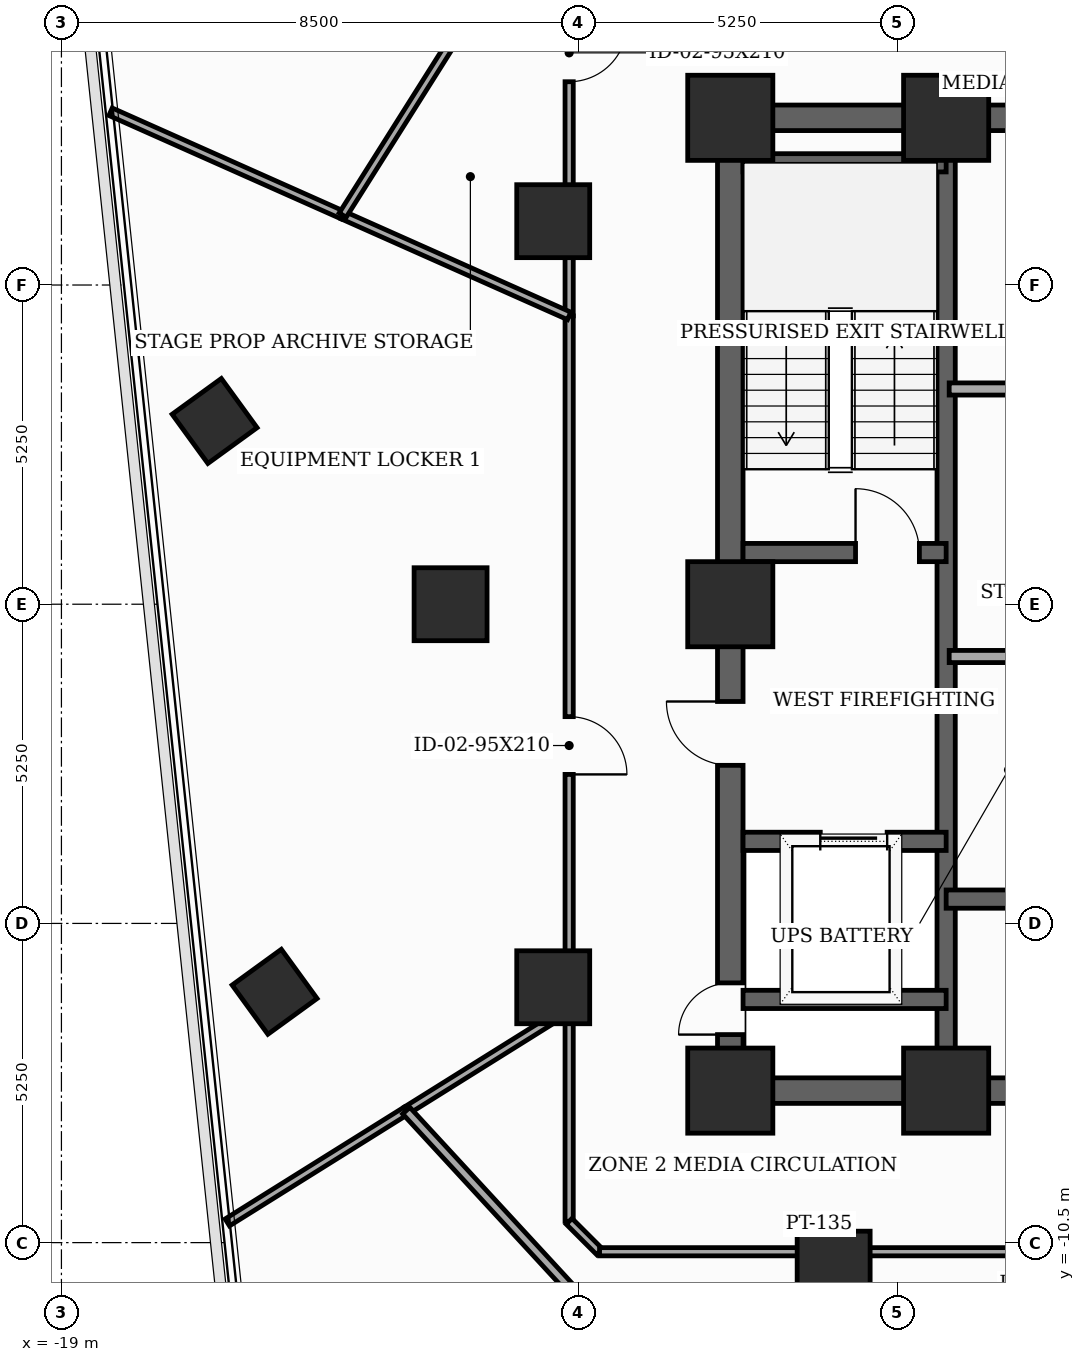
"""IFC4 building model, lengths in metres.
Left out: names, types, materials, properties, quantities, classifications, styles, units other than length and angle.
Written with IfcOpenShell. Run it as: python <this file> out.ifc"""

import sys

from ifc_helpers import new_model, si_unit, direction, frame, frame_2d, origin, origin_2d, place, context, subcontext, project, spatial, rectangle, extrude, element, fill, save


model = new_model("IFC4")
c1 = context("Model", 3, precision=1e-05, world=origin(), true_north=direction((0.0, 1.0)))
c2 = subcontext(c1, "Body", "Model", "MODEL_VIEW")
j1 = project(units=[si_unit("LENGTHUNIT", "METRE"), si_unit("PLANEANGLEUNIT", "RADIAN")], contexts=[c1])
p1 = place(None, origin())
s1 = spatial("IfcSite", under=j1, at=p1, CompositionType="ELEMENT")
p2 = place(p1, origin())
s2 = spatial("IfcBuilding", under=s1, at=p2, CompositionType="ELEMENT")
p3 = place(p2, frame((0.0, 0.0, 162.0)))
s3 = spatial("IfcBuildingStorey", under=s2, at=p3, CompositionType="ELEMENT", Elevation=162.0)
for number, where, z_axis, x_axis in (
    (1, (-8.0, -8.0, 0.0), (0.0, 0.0, 1.0), (1.0, 0.0, 0.0)),
    (2, (-4.45, -8.0, 0.0), (0.0, 0.0, 1.0), (1.0, 0.0, 0.0)),
    (3, (-4.45, 8.0, 0.0), (0.0, 0.0, 1.0), (1.0, 0.0, 0.0)),
    (4, (-8.0, 8.0, 0.0), (0.0, 0.0, 1.0), (1.0, 0.0, 0.0)),
    (5, (-8.0, 0.0, 0.0), (0.0, 0.0, 1.0), (1.0, 0.0, 0.0)),
):
    element("IfcColumn", number, at=place(p3, frame(where, z_axis=z_axis, x_axis=x_axis)), inside=s3, PredefinedType="COLUMN", context=c2, shape_type="SweptSolid", body=[
        extrude(rectangle(XDim=1.4, YDim=1.4, at=origin_2d()), origin(), (0.0, 0.0, 1.0), 3.7),
    ])
for number, where, z_axis, x_axis in (
    (6, (-10.912, 6.3, 0.0), (0.0, 0.0, 1.0), (1.0, 0.0, 0.0)),
    (7, (-12.6, 0.0, 0.0), (0.0, 0.0, 1.0), (1.0, 0.0, 0.0)),
    (8, (-10.912, -6.3, 0.0), (0.0, 0.0, 1.0), (1.0, 0.0, 0.0)),
    (9, (-6.3, -10.912, 0.0), (0.0, 0.0, 1.0), (1.0, 0.0, 0.0)),
):
    element("IfcColumn", number, at=place(p3, frame(where, z_axis=z_axis, x_axis=x_axis)), inside=s3, PredefinedType="COLUMN", context=c2, shape_type="SweptSolid", body=[
        extrude(rectangle(XDim=1.2, YDim=1.2, at=origin_2d()), origin(), (0.0, 0.0, 1.0), 3.7),
    ])
for number, where, z_axis, x_axis in (
    (10, (-16.481, 3.014, 0.0), (0.0, 0.0, 1.0), (0.809, 0.588, 0.0)),
    (11, (-15.494, -6.375, 0.0), (0.0, 0.0, 1.0), (0.809, 0.588, 0.0)),
):
    element("IfcColumn", number, at=place(p3, frame(where, z_axis=z_axis, x_axis=x_axis)), inside=s3, PredefinedType="COLUMN", context=c2, shape_type="SweptSolid", body=[
        extrude(rectangle(XDim=1.0, YDim=1.0, at=origin_2d()), origin(), (0.0, 0.0, 1.0), 3.7),
    ])
p4 = place(p3, frame((-8.0, -8.0, 0.0), z_axis=(0.0, 0.0, 1.0), x_axis=(0.0, 1.0, 0.0)))
e12 = element("IfcWall", 12, at=p4, inside=s3, PredefinedType="SHEAR", context=c2, shape_type="SweptSolid", body=[
    extrude(rectangle(XDim=16.0, YDim=0.42, at=frame_2d((8.0, 0.0))), origin(), (0.0, 0.0, 1.0), 3.5),
])
p5 = place(p4, frame((0.922, 0.0, 0.0)))
e13 = element("IfcOpeningElement", 13, at=p5, cuts=e12, PredefinedType="OPENING", context=c2, shape_type="SweptSolid", body=[
    extrude(rectangle(XDim=0.85, YDim=2.02, at=frame_2d((0.425, 1.01))), frame((0.0, 0.22, 0.0), z_axis=(0.0, -1.0, 0.0), x_axis=(1.0, 0.0, 0.0)), (0.0, 0.0, 1.0), 0.44),
])
p6 = place(p4, frame((5.35, 0.0, 0.0)))
e14 = element("IfcOpeningElement", 14, at=p6, cuts=e12, PredefinedType="OPENING", context=c2, shape_type="SweptSolid", body=[
    extrude(rectangle(XDim=1.05, YDim=2.15, at=frame_2d((0.525, 1.075))), frame((0.0, 0.22, 0.0), z_axis=(0.0, -1.0, 0.0), x_axis=(1.0, 0.0, 0.0)), (0.0, 0.0, 1.0), 0.44),
])
p7 = place(p3, frame((-8.0, -8.0, 0.0), z_axis=(0.0, 0.0, 1.0), x_axis=(1.0, 0.0, 0.0)))
e15 = element("IfcWall", 15, at=p7, inside=s3, PredefinedType="SHEAR", context=c2, shape_type="SweptSolid", body=[
    extrude(rectangle(XDim=16.0, YDim=0.42, at=frame_2d((8.0, 0.0))), origin(), (0.0, 0.0, 1.0), 3.5),
])
p8 = place(p7, frame((5.2, 0.0, 0.0)))
e16 = element("IfcOpeningElement", 16, at=p8, cuts=e15, PredefinedType="OPENING", context=c2, shape_type="SweptSolid", body=[
    extrude(rectangle(XDim=0.95, YDim=2.1, at=frame_2d((0.475, 1.05))), frame((0.0, 0.22, 0.0), z_axis=(0.0, -1.0, 0.0), x_axis=(1.0, 0.0, 0.0)), (0.0, 0.0, 1.0), 0.44),
])
p9 = place(p7, frame((9.8, 0.0, 0.0)))
e17 = element("IfcOpeningElement", 17, at=p9, cuts=e15, PredefinedType="OPENING", context=c2, shape_type="SweptSolid", body=[
    extrude(rectangle(XDim=0.95, YDim=2.1, at=frame_2d((0.475, 1.05))), frame((0.0, 0.22, 0.0), z_axis=(0.0, -1.0, 0.0), x_axis=(1.0, 0.0, 0.0)), (0.0, 0.0, 1.0), 0.44),
])
p10 = place(p3, frame((-8.0, 8.0, 0.0), z_axis=(0.0, 0.0, 1.0), x_axis=(1.0, 0.0, 0.0)))
e18 = element("IfcWall", 18, at=p10, inside=s3, PredefinedType="SHEAR", context=c2, shape_type="SweptSolid", body=[
    extrude(rectangle(XDim=16.0, YDim=0.42, at=frame_2d((8.0, 0.0))), origin(), (0.0, 0.0, 1.0), 3.5),
])
p11 = place(p10, frame((7.1, 0.0, 0.0)))
e19 = element("IfcOpeningElement", 19, at=p11, cuts=e18, PredefinedType="OPENING", context=c2, shape_type="SweptSolid", body=[
    extrude(rectangle(XDim=1.8, YDim=2.15, at=frame_2d((0.9, 1.075))), frame((0.0, 0.22, 0.0), z_axis=(0.0, -1.0, 0.0), x_axis=(1.0, 0.0, 0.0)), (0.0, 0.0, 1.0), 0.44),
])
p12 = place(p3, frame((-4.45, -7.79, 0.0), z_axis=(0.0, 0.0, 1.0), x_axis=(0.0, 1.0, 0.0)))
e20 = element("IfcWall", 20, at=p12, inside=s3, PredefinedType="SHEAR", context=c2, shape_type="SweptSolid", body=[
    extrude(rectangle(XDim=15.58, YDim=0.3, at=frame_2d((7.79, 0.0))), origin(), (0.0, 0.0, 1.0), 3.5),
])
p13 = place(p3, frame((-7.79, 0.85, 0.0), z_axis=(0.0, 0.0, 1.0), x_axis=(1.0, 0.0, 0.0)))
e21 = element("IfcWall", 21, at=p13, inside=s3, PredefinedType="SHEAR", context=c2, shape_type="SweptSolid", body=[
    extrude(rectangle(XDim=3.34, YDim=0.3, at=frame_2d((1.67, 0.0))), origin(), (0.0, 0.0, 1.0), 3.5),
])
p14 = place(p13, frame((1.85, 0.0, 0.0)))
e22 = element("IfcOpeningElement", 22, at=p14, cuts=e21, PredefinedType="OPENING", context=c2, shape_type="SweptSolid", body=[
    extrude(rectangle(XDim=1.05, YDim=2.15, at=frame_2d((0.525, 1.075))), frame((0.0, 0.16, 0.0), z_axis=(0.0, -1.0, 0.0), x_axis=(1.0, 0.0, 0.0)), (0.0, 0.0, 1.0), 0.32),
])
p15 = place(p3, frame((-7.79, 7.26, 0.0), z_axis=(0.0, 0.0, 1.0), x_axis=(1.0, 0.0, 0.0)))
e23 = element("IfcWall", 23, at=p15, inside=s3, PredefinedType="SHEAR", context=c2, shape_type="SweptSolid", body=[
    extrude(rectangle(XDim=3.34, YDim=0.3, at=frame_2d((1.67, 0.0))), origin(), (0.0, 0.0, 1.0), 3.5),
])
p16 = place(p3, frame((-7.79, -3.9, 0.0), z_axis=(0.0, 0.0, 1.0), x_axis=(1.0, 0.0, 0.0)))
e24 = element("IfcWall", 24, at=p16, inside=s3, PredefinedType="SHEAR", context=c2, shape_type="SweptSolid", body=[
    extrude(rectangle(XDim=3.34, YDim=0.3, at=frame_2d((1.67, 0.0))), origin(), (0.0, 0.0, 1.0), 3.5),
])
p17 = place(p16, frame((1.27, 0.0, 0.0)))
e25 = element("IfcOpeningElement", 25, at=p17, cuts=e24, PredefinedType="OPENING", context=c2, shape_type="SweptSolid", body=[
    extrude(rectangle(XDim=1.1, YDim=2.1, at=frame_2d((0.55, 1.05))), frame((0.0, 0.16, 0.0), z_axis=(0.0, -1.0, 0.0), x_axis=(1.0, 0.0, 0.0)), (0.0, 0.0, 1.0), 0.32),
])
p18 = place(p3, frame((-7.79, -6.5, 0.0), z_axis=(0.0, 0.0, 1.0), x_axis=(1.0, 0.0, 0.0)))
e26 = element("IfcWall", 26, at=p18, inside=s3, PredefinedType="SHEAR", context=c2, shape_type="SweptSolid", body=[
    extrude(rectangle(XDim=3.34, YDim=0.3, at=frame_2d((1.67, 0.0))), origin(), (0.0, 0.0, 1.0), 3.5),
])
p19 = place(p3, frame((-4.45, -4.85, 0.0), z_axis=(0.0, 0.0, 1.0), x_axis=(1.0, 0.0, 0.0)))
e27 = element("IfcWall", 27, at=p19, inside=s3, PredefinedType="SHEAR", context=c2, shape_type="SweptSolid", body=[
    extrude(rectangle(XDim=8.9, YDim=0.3, at=frame_2d((4.45, 0.0))), origin(), (0.0, 0.0, 1.0), 3.5),
])
for number, where, z_axis, x_axis in (
    (28, (-4.4, -0.86, 0.0), (0.0, 0.0, 1.0), (1.0, 0.0, 0.0)),
    (29, (-4.4, 3.54, 0.0), (0.0, 0.0, 1.0), (1.0, 0.0, 0.0)),
):
    element("IfcWall", number, at=place(p3, frame(where, z_axis=z_axis, x_axis=x_axis)), inside=s3, PredefinedType="SOLIDWALL", context=c2, shape_type="SweptSolid", body=[
        extrude(rectangle(XDim=2.68, YDim=0.2, at=frame_2d((1.34, 0.0))), origin(), (0.0, 0.0, 1.0), 3.5),
    ])
p20 = place(p3, frame((-10.65, 4.742, 0.0), z_axis=(0.0, 0.0, 1.0), x_axis=(0.0, -1.0, 0.0)))
e30 = element("IfcWall", 30, at=p20, inside=s3, PredefinedType="PARTITIONING", context=c2, shape_type="SweptSolid", body=[
    extrude(rectangle(XDim=11.397, YDim=0.135, at=frame_2d((5.698, 0.0))), origin(), (0.0, 0.0, 1.0), 2.885),
])
p21 = place(p20, frame((6.591, 0.0, 0.0)))
e31 = element("IfcOpeningElement", 31, at=p21, cuts=e30, PredefinedType="OPENING", context=c2, shape_type="SweptSolid", body=[
    extrude(rectangle(XDim=0.95, YDim=2.1, at=frame_2d((0.475, 1.05))), frame((0.0, 0.077, 0.0), z_axis=(0.0, -1.0, 0.0), x_axis=(1.0, 0.0, 0.0)), (0.0, 0.0, 1.0), 0.155),
])
p22 = place(p3, frame((-10.65, -6.655, 0.0), z_axis=(0.0, 0.0, 1.0), x_axis=(0.0, -1.0, 0.0)))
e32 = element("IfcWall", 32, at=p22, inside=s3, PredefinedType="PARTITIONING", context=c2, shape_type="SweptSolid", body=[
    extrude(rectangle(XDim=3.495, YDim=0.135, at=frame_2d((1.748, 0.0))), origin(), (0.0, 0.0, 1.0), 2.885),
])
p23 = place(p3, frame((-10.65, -10.15, 0.0), z_axis=(0.0, 0.0, 1.0), x_axis=(0.707106781187, -0.707106781187, 0.0)))
e33 = element("IfcWall", 33, at=p23, inside=s3, PredefinedType="PARTITIONING", context=c2, shape_type="SweptSolid", body=[
    extrude(rectangle(XDim=0.707, YDim=0.135, at=frame_2d((0.354, 0.0))), origin(), (0.0, 0.0, 1.0), 3.5),
])
p24 = place(p3, frame((-10.15, -10.65, 0.0), z_axis=(0.0, 0.0, 1.0), x_axis=(1.0, 0.0, 0.0)))
e34 = element("IfcWall", 34, at=p24, inside=s3, PredefinedType="PARTITIONING", context=c2, shape_type="SweptSolid", body=[
    extrude(rectangle(XDim=12.414, YDim=0.135, at=frame_2d((6.207, 0.0))), origin(), (0.0, 0.0, 1.0), 2.885),
])
p25 = place(p24, frame((7.222, 0.0, 0.0)))
e35 = element("IfcOpeningElement", 35, at=p25, cuts=e34, PredefinedType="OPENING", context=c2, shape_type="SweptSolid", body=[
    extrude(rectangle(XDim=0.95, YDim=2.1, at=frame_2d((0.475, 1.05))), frame((0.0, 0.077, 0.0), z_axis=(0.0, -1.0, 0.0), x_axis=(1.0, 0.0, 0.0)), (0.0, 0.0, 1.0), 0.155),
])
p26 = place(p3, frame((-10.65, 10.15, 0.0), z_axis=(0.0, 0.0, 1.0), x_axis=(0.0, -1.0, 0.0)))
e36 = element("IfcWall", 36, at=p26, inside=s3, PredefinedType="PARTITIONING", context=c2, shape_type="SweptSolid", body=[
    extrude(rectangle(XDim=5.408, YDim=0.135, at=frame_2d((2.704, 0.0))), origin(), (0.0, 0.0, 1.0), 2.885),
])
p27 = place(p26, frame((0.607, 0.0, 0.0)))
e37 = element("IfcOpeningElement", 37, at=p27, cuts=e36, PredefinedType="OPENING", context=c2, shape_type="SweptSolid", body=[
    extrude(rectangle(XDim=0.95, YDim=2.1, at=frame_2d((0.475, 1.05))), frame((0.0, 0.077, 0.0), z_axis=(0.0, -1.0, 0.0), x_axis=(1.0, 0.0, 0.0)), (0.0, 0.0, 1.0), 0.155),
])
p28 = place(p3, frame((-16.272, -10.167, 0.0), z_axis=(0.0, 0.0, 1.0), x_axis=(0.848097115085, 0.529840809474, 0.0)))
e38 = element("IfcWall", 38, at=p28, inside=s3, PredefinedType="PARTITIONING", context=c2, shape_type="SweptSolid", body=[
    extrude(rectangle(XDim=3.47, YDim=0.135, at=frame_2d((1.735, 0.0))), origin(), (0.0, 0.0, 1.0), 2.985),
])
p29 = place(p3, frame((-13.329, -8.329, 0.0), z_axis=(0.0, 0.0, 1.0), x_axis=(0.848059079617, 0.529901686617, 0.0)))
e39 = element("IfcWall", 39, at=p29, inside=s3, PredefinedType="PARTITIONING", context=c2, shape_type="SweptSolid", body=[
    extrude(rectangle(XDim=3.159, YDim=0.135, at=frame_2d((1.58, 0.0))), origin(), (0.0, 0.0, 1.0), 2.885),
])
p30 = place(p3, frame((-14.374, 6.4, 0.0), z_axis=(0.0, 0.0, 1.0), x_axis=(-0.913556010805, 0.406712939457, 0.0)))
e40 = element("IfcWall", 40, at=p30, inside=s3, PredefinedType="PARTITIONING", context=c2, shape_type="SweptSolid", body=[
    extrude(rectangle(XDim=4.179, YDim=0.135, at=frame_2d((2.09, 0.0))), origin(), (0.0, 0.0, 1.0), 2.985),
])
p31 = place(p3, frame((-10.65, 4.742, 0.0), z_axis=(0.0, 0.0, 1.0), x_axis=(-0.913556992648, 0.406710734042, 0.0)))
e41 = element("IfcWall", 41, at=p31, inside=s3, PredefinedType="PARTITIONING", context=c2, shape_type="SweptSolid", body=[
    extrude(rectangle(XDim=4.076, YDim=0.135, at=frame_2d((2.038, 0.0))), origin(), (0.0, 0.0, 1.0), 2.885),
])
p32 = place(p3, frame((-9.1, -12.916, 0.0), z_axis=(0.0, 0.0, 1.0), x_axis=(-0.677841155448, 0.735208384052, 0.0)))
e42 = element("IfcWall", 42, at=p32, inside=s3, PredefinedType="PARTITIONING", context=c2, shape_type="SweptSolid", body=[
    extrude(rectangle(XDim=6.239, YDim=0.16, at=frame_2d((3.12, 0.0))), origin(), (0.0, 0.0, 1.0), 2.885),
])
p33 = place(p3, frame((-14.374, 6.4, 0.0), z_axis=(0.0, 0.0, 1.0), x_axis=(0.53356651363, 0.845758106986, 0.0)))
e43 = element("IfcWall", 43, at=p33, inside=s3, PredefinedType="PARTITIONING", context=c2, shape_type="SweptSolid", body=[
    extrude(rectangle(XDim=4.933, YDim=0.135, at=frame_2d((2.467, 0.0))), origin(), (0.0, 0.0, 1.0), 2.885),
])
p34 = place(p5, origin())
e44 = element("IfcDoor", 44, at=p34, inside=s3, OperationType="SINGLE_SWING_LEFT", PredefinedType="TRAPDOOR", context=c2, shape_type="SweptSolid", body=[
    extrude(rectangle(XDim=0.85, YDim=2.02, at=frame_2d((0.425, 1.01))), frame((0.0, 0.025, 0.0), z_axis=(0.0, -1.0, 0.0), x_axis=(1.0, 0.0, 0.0)), (0.0, 0.0, 1.0), 0.05),
])
fill(e13, e44)
p35 = place(p6, origin())
e45 = element("IfcDoor", 45, at=p35, inside=s3, OperationType="SINGLE_SWING_RIGHT", PredefinedType="DOOR", context=c2, shape_type="SweptSolid", body=[
    extrude(rectangle(XDim=1.05, YDim=2.15, at=frame_2d((0.525, 1.075))), frame((0.0, 0.025, 0.0), z_axis=(0.0, -1.0, 0.0), x_axis=(1.0, 0.0, 0.0)), (0.0, 0.0, 1.0), 0.05),
])
fill(e14, e45)
p36 = place(p14, origin())
e46 = element("IfcDoor", 46, at=p36, inside=s3, OperationType="SINGLE_SWING_LEFT", PredefinedType="DOOR", context=c2, shape_type="SweptSolid", body=[
    extrude(rectangle(XDim=1.05, YDim=2.15, at=frame_2d((0.525, 1.075))), frame((0.0, 0.025, 0.0), z_axis=(0.0, -1.0, 0.0), x_axis=(1.0, 0.0, 0.0)), (0.0, 0.0, 1.0), 0.05),
])
fill(e22, e46)
p37 = place(p17, origin())
e47 = element("IfcDoor", 47, at=p37, inside=s3, OperationType="SLIDING_TO_LEFT", PredefinedType="DOOR", context=c2, shape_type="SweptSolid", body=[
    extrude(rectangle(XDim=1.1, YDim=2.1, at=frame_2d((0.55, 1.05))), frame((0.0, 0.025, 0.0), z_axis=(0.0, -1.0, 0.0), x_axis=(1.0, 0.0, 0.0)), (0.0, 0.0, 1.0), 0.05),
])
fill(e25, e47)
p38 = place(p21, origin())
e48 = element("IfcDoor", 48, at=p38, inside=s3, OperationType="SINGLE_SWING_RIGHT", PredefinedType="DOOR", context=c2, shape_type="SweptSolid", body=[
    extrude(rectangle(XDim=0.95, YDim=2.1, at=frame_2d((0.475, 1.05))), frame((0.0, 0.025, 0.0), z_axis=(0.0, -1.0, 0.0), x_axis=(1.0, 0.0, 0.0)), (0.0, 0.0, 1.0), 0.05),
])
fill(e31, e48)
p39 = place(p27, origin())
e49 = element("IfcDoor", 49, at=p39, inside=s3, OperationType="SINGLE_SWING_LEFT", PredefinedType="DOOR", context=c2, shape_type="SweptSolid", body=[
    extrude(rectangle(XDim=0.95, YDim=2.1, at=frame_2d((0.475, 1.05))), frame((0.0, 0.025, 0.0), z_axis=(0.0, -1.0, 0.0), x_axis=(1.0, 0.0, 0.0)), (0.0, 0.0, 1.0), 0.05),
])
fill(e37, e49)
save(model, sys.argv[1])
